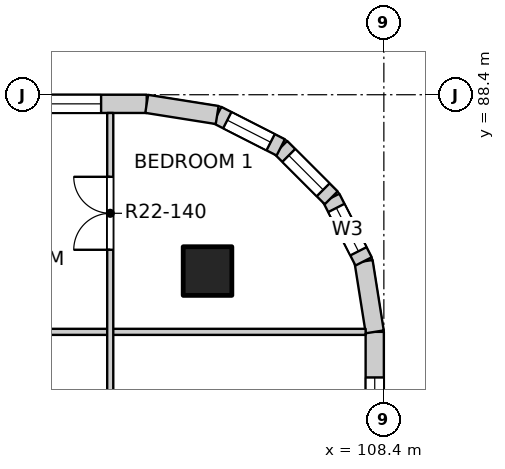
"""IFC4 building model, lengths in metres.
Left out: names, types, materials, properties, quantities, classifications, styles, units other than length and angle.
Written with IfcOpenShell. Run it as: python <this file> out.ifc"""

import sys

from ifc_helpers import new_model, si_unit, direction, frame, frame_2d, origin, origin_2d, place, context, subcontext, project, spatial, rectangle, extrude, element, fill, save


model = new_model("IFC4")
c1 = context("Model", 3, precision=1e-05, world=origin(), true_north=direction((0.0, 1.0)))
c2 = subcontext(c1, "Body", "Model", "MODEL_VIEW")
j1 = project(units=[si_unit("LENGTHUNIT", "METRE"), si_unit("PLANEANGLEUNIT", "RADIAN")], contexts=[c1])
p1 = place(None, origin())
s1 = spatial("IfcSite", under=j1, at=p1, CompositionType="ELEMENT")
p2 = place(p1, origin())
s2 = spatial("IfcBuilding", under=s1, at=p2, CompositionType="ELEMENT")
p3 = place(p2, frame((0.0, 0.0, 224.5)))
s3 = spatial("IfcBuildingStorey", under=s2, at=p3, CompositionType="ELEMENT", Elevation=224.5)
p4 = place(p3, frame((105.5, 85.5, -0.25), z_axis=(0.0, 0.0, 1.0), x_axis=(1.0, 0.0, 0.0)))
e1 = element("IfcColumn", 1, at=p4, inside=s3, PredefinedType="COLUMN", context=c2, shape_type="SweptSolid", body=[
    extrude(rectangle(XDim=0.8, YDim=0.8, at=origin_2d()), origin(), (0.0, 0.0, 1.0), 3.4),
])
p5 = place(p3, frame((108.25, 77.1, 0.0), z_axis=(0.0, 0.0, 1.0), x_axis=(0.0, 1.0, 0.0)))
e2 = element("IfcWall", 2, at=p5, inside=s3, PredefinedType="SOLIDWALL", context=c2, shape_type="SweptSolid", body=[
    extrude(rectangle(XDim=7.4, YDim=0.3, at=frame_2d((3.7, 0.0))), origin(), (0.0, 0.0, 1.0), 2.7),
])
p6 = place(p5, frame((0.35, 0.0, 0.9)))
e3 = element("IfcOpeningElement", 3, at=p6, cuts=e2, PredefinedType="OPENING", context=c2, shape_type="SweptSolid", body=[
    extrude(rectangle(XDim=2.4, YDim=1.8, at=frame_2d((1.2, 0.9))), frame((0.0, 0.16, 0.0), z_axis=(0.0, -1.0, 0.0), x_axis=(1.0, 0.0, 0.0)), (0.0, 0.0, 1.0), 0.32),
])
p7 = place(p5, frame((4.25, 0.0, 0.9)))
e4 = element("IfcOpeningElement", 4, at=p7, cuts=e2, PredefinedType="OPENING", context=c2, shape_type="SweptSolid", body=[
    extrude(rectangle(XDim=2.4, YDim=1.8, at=frame_2d((1.2, 0.9))), frame((0.0, 0.16, 0.0), z_axis=(0.0, -1.0, 0.0), x_axis=(1.0, 0.0, 0.0)), (0.0, 0.0, 1.0), 0.32),
])
p8 = place(p3, frame((97.1, 88.25, 0.0), z_axis=(0.0, 0.0, 1.0), x_axis=(1.0, 0.0, 0.0)))
e5 = element("IfcWall", 5, at=p8, inside=s3, PredefinedType="SOLIDWALL", context=c2, shape_type="SweptSolid", body=[
    extrude(rectangle(XDim=7.4, YDim=0.3, at=frame_2d((3.7, 0.0))), origin(), (0.0, 0.0, 1.0), 2.7),
])
p9 = place(p8, frame((0.35, 0.0, 0.9)))
e6 = element("IfcOpeningElement", 6, at=p9, cuts=e5, PredefinedType="OPENING", context=c2, shape_type="SweptSolid", body=[
    extrude(rectangle(XDim=2.4, YDim=1.8, at=frame_2d((1.2, 0.9))), frame((0.0, 0.16, 0.0), z_axis=(0.0, -1.0, 0.0), x_axis=(1.0, 0.0, 0.0)), (0.0, 0.0, 1.0), 0.32),
])
p10 = place(p8, frame((4.25, 0.0, 0.9)))
e7 = element("IfcOpeningElement", 7, at=p10, cuts=e5, PredefinedType="OPENING", context=c2, shape_type="SweptSolid", body=[
    extrude(rectangle(XDim=2.4, YDim=1.8, at=frame_2d((1.2, 0.9))), frame((0.0, 0.16, 0.0), z_axis=(0.0, -1.0, 0.0), x_axis=(1.0, 0.0, 0.0)), (0.0, 0.0, 1.0), 0.32),
])
p11 = place(p3, frame((108.25, 84.5, 0.0), z_axis=(0.0, 0.0, 1.0), x_axis=(-0.156496880861, 0.987678452879, 0.0)))
e8 = element("IfcWall", 8, at=p11, inside=s3, PredefinedType="SOLIDWALL", context=c2, shape_type="SweptSolid", body=[
    extrude(rectangle(XDim=1.173, YDim=0.3, at=frame_2d((0.586, 0.0))), origin(), (0.0, 0.0, 1.0), 2.7),
])
p12 = place(p3, frame((108.066, 85.659, 0.0), z_axis=(0.0, 0.0, 1.0), x_axis=(-0.454025524128, 0.890988677504, 0.0)))
e9 = element("IfcWall", 9, at=p12, inside=s3, PredefinedType="SOLIDWALL", context=c2, shape_type="SweptSolid", body=[
    extrude(rectangle(XDim=1.173, YDim=0.3, at=frame_2d((0.587, 0.0))), origin(), (0.0, 0.0, 1.0), 2.7),
])
p13 = place(p12, frame((0.187, 0.0, 0.9)))
e10 = element("IfcOpeningElement", 10, at=p13, cuts=e9, PredefinedType="OPENING", context=c2, shape_type="SweptSolid", body=[
    extrude(rectangle(XDim=0.8, YDim=1.2, at=frame_2d((0.4, 0.6))), frame((0.0, 0.16, 0.0), z_axis=(0.0, -1.0, 0.0), x_axis=(1.0, 0.0, 0.0)), (0.0, 0.0, 1.0), 0.32),
])
p14 = place(p3, frame((107.534, 86.704, 0.0), z_axis=(0.0, 0.0, 1.0), x_axis=(-0.707106781187, 0.707106781187, 0.0)))
e11 = element("IfcWall", 11, at=p14, inside=s3, PredefinedType="SOLIDWALL", context=c2, shape_type="SweptSolid", body=[
    extrude(rectangle(XDim=1.173, YDim=0.3, at=frame_2d((0.586, 0.0))), origin(), (0.0, 0.0, 1.0), 2.7),
])
p15 = place(p14, frame((0.187, 0.0, 0.9)))
e12 = element("IfcOpeningElement", 12, at=p15, cuts=e11, PredefinedType="OPENING", context=c2, shape_type="SweptSolid", body=[
    extrude(rectangle(XDim=0.8, YDim=1.2, at=frame_2d((0.4, 0.6))), frame((0.0, 0.16, 0.0), z_axis=(0.0, -1.0, 0.0), x_axis=(1.0, 0.0, 0.0)), (0.0, 0.0, 1.0), 0.32),
])
p16 = place(p3, frame((106.704, 87.534, 0.0), z_axis=(0.0, 0.0, 1.0), x_axis=(-0.890988677504, 0.454025524128, 0.0)))
e13 = element("IfcWall", 13, at=p16, inside=s3, PredefinedType="SOLIDWALL", context=c2, shape_type="SweptSolid", body=[
    extrude(rectangle(XDim=1.173, YDim=0.3, at=frame_2d((0.587, 0.0))), origin(), (0.0, 0.0, 1.0), 2.7),
])
p17 = place(p16, frame((0.187, 0.0, 0.9)))
e14 = element("IfcOpeningElement", 14, at=p17, cuts=e13, PredefinedType="OPENING", context=c2, shape_type="SweptSolid", body=[
    extrude(rectangle(XDim=0.8, YDim=1.2, at=frame_2d((0.4, 0.6))), frame((0.0, 0.16, 0.0), z_axis=(0.0, -1.0, 0.0), x_axis=(1.0, 0.0, 0.0)), (0.0, 0.0, 1.0), 0.32),
])
p18 = place(p3, frame((105.659, 88.066, 0.0), z_axis=(0.0, 0.0, 1.0), x_axis=(-0.987678452879, 0.156496880861, 0.0)))
e15 = element("IfcWall", 15, at=p18, inside=s3, PredefinedType="SOLIDWALL", context=c2, shape_type="SweptSolid", body=[
    extrude(rectangle(XDim=1.173, YDim=0.3, at=frame_2d((0.586, 0.0))), origin(), (0.0, 0.0, 1.0), 2.7),
])
p19 = place(p3, frame((96.6, 84.5, 0.0), z_axis=(0.0, 0.0, 1.0), x_axis=(1.0, 0.0, 0.0)))
e16 = element("IfcWall", 16, at=p19, inside=s3, PredefinedType="PARTITIONING", context=c2, shape_type="SweptSolid", body=[
    extrude(rectangle(XDim=11.5, YDim=0.1, at=frame_2d((5.75, 0.0))), origin(), (0.0, 0.0, 1.0), 3.15),
])
p20 = place(p19, frame((2.635, 0.0, 0.0)))
e17 = element("IfcOpeningElement", 17, at=p20, cuts=e16, PredefinedType="OPENING", context=c2, shape_type="SweptSolid", body=[
    extrude(rectangle(XDim=0.9, YDim=2.1, at=frame_2d((0.45, 1.05))), frame((0.0, 0.06, 0.0), z_axis=(0.0, -1.0, 0.0), x_axis=(1.0, 0.0, 0.0)), (0.0, 0.0, 1.0), 0.12),
])
p21 = place(p3, frame((103.9, 76.8, 0.0), z_axis=(0.0, 0.0, 1.0), x_axis=(0.0, 1.0, 0.0)))
e18 = element("IfcWall", 18, at=p21, inside=s3, PredefinedType="PARTITIONING", context=c2, shape_type="SweptSolid", body=[
    extrude(rectangle(XDim=11.3, YDim=0.1, at=frame_2d((5.65, 0.0))), origin(), (0.0, 0.0, 1.0), 3.15),
])
p22 = place(p21, frame((1.25, 0.0, 0.0)))
e19 = element("IfcOpeningElement", 19, at=p22, cuts=e18, PredefinedType="OPENING", context=c2, shape_type="SweptSolid", body=[
    extrude(rectangle(XDim=1.2, YDim=2.1, at=frame_2d((0.6, 1.05))), frame((0.0, 0.06, 0.0), z_axis=(0.0, -1.0, 0.0), x_axis=(1.0, 0.0, 0.0)), (0.0, 0.0, 1.0), 0.12),
])
p23 = place(p21, frame((5.15, 0.0, 0.0)))
e20 = element("IfcOpeningElement", 20, at=p23, cuts=e18, PredefinedType="OPENING", context=c2, shape_type="SweptSolid", body=[
    extrude(rectangle(XDim=1.2, YDim=2.1, at=frame_2d((0.6, 1.05))), frame((0.0, 0.06, 0.0), z_axis=(0.0, -1.0, 0.0), x_axis=(1.0, 0.0, 0.0)), (0.0, 0.0, 1.0), 0.12),
])
p24 = place(p21, frame((9.05, 0.0, 0.0)))
e21 = element("IfcOpeningElement", 21, at=p24, cuts=e18, PredefinedType="OPENING", context=c2, shape_type="SweptSolid", body=[
    extrude(rectangle(XDim=1.2, YDim=2.1, at=frame_2d((0.6, 1.05))), frame((0.0, 0.06, 0.0), z_axis=(0.0, -1.0, 0.0), x_axis=(1.0, 0.0, 0.0)), (0.0, 0.0, 1.0), 0.12),
])
p25 = place(p7, origin())
e22 = element("IfcWindow", 22, at=p25, inside=s3, PartitioningType="DOUBLE_PANEL_VERTICAL", PredefinedType="WINDOW", context=c2, shape_type="SweptSolid", body=[
    extrude(rectangle(XDim=2.4, YDim=1.8, at=frame_2d((1.2, 0.9))), frame((0.0, 0.03, 0.0), z_axis=(0.0, -1.0, 0.0), x_axis=(1.0, 0.0, 0.0)), (0.0, 0.0, 1.0), 0.06),
])
fill(e4, e22)
p26 = place(p10, origin())
e23 = element("IfcWindow", 23, at=p26, inside=s3, PartitioningType="DOUBLE_PANEL_VERTICAL", PredefinedType="WINDOW", context=c2, shape_type="SweptSolid", body=[
    extrude(rectangle(XDim=2.4, YDim=1.8, at=frame_2d((1.2, 0.9))), frame((0.0, 0.03, 0.0), z_axis=(0.0, -1.0, 0.0), x_axis=(1.0, 0.0, 0.0)), (0.0, 0.0, 1.0), 0.06),
])
fill(e7, e23)
p27 = place(p13, origin())
e24 = element("IfcWindow", 24, at=p27, inside=s3, PartitioningType="SINGLE_PANEL", PredefinedType="WINDOW", context=c2, shape_type="SweptSolid", body=[
    extrude(rectangle(XDim=0.8, YDim=1.2, at=frame_2d((0.4, 0.6))), frame((0.0, 0.03, 0.0), z_axis=(0.0, -1.0, 0.0), x_axis=(1.0, 0.0, 0.0)), (0.0, 0.0, 1.0), 0.06),
])
fill(e10, e24)
p28 = place(p15, origin())
e25 = element("IfcWindow", 25, at=p28, inside=s3, PartitioningType="SINGLE_PANEL", PredefinedType="WINDOW", context=c2, shape_type="SweptSolid", body=[
    extrude(rectangle(XDim=0.8, YDim=1.2, at=frame_2d((0.4, 0.6))), frame((0.0, 0.03, 0.0), z_axis=(0.0, -1.0, 0.0), x_axis=(1.0, 0.0, 0.0)), (0.0, 0.0, 1.0), 0.06),
])
fill(e12, e25)
p29 = place(p17, origin())
e26 = element("IfcWindow", 26, at=p29, inside=s3, PartitioningType="SINGLE_PANEL", PredefinedType="WINDOW", context=c2, shape_type="SweptSolid", body=[
    extrude(rectangle(XDim=0.8, YDim=1.2, at=frame_2d((0.4, 0.6))), frame((0.0, 0.03, 0.0), z_axis=(0.0, -1.0, 0.0), x_axis=(1.0, 0.0, 0.0)), (0.0, 0.0, 1.0), 0.06),
])
fill(e14, e26)
p30 = place(p24, origin())
e27 = element("IfcDoor", 27, at=p30, inside=s3, OperationType="DOUBLE_DOOR_SINGLE_SWING", PredefinedType="DOOR", context=c2, shape_type="SweptSolid", body=[
    extrude(rectangle(XDim=1.2, YDim=2.1, at=frame_2d((0.6, 1.05))), frame((0.0, 0.025, 0.0), z_axis=(0.0, -1.0, 0.0), x_axis=(1.0, 0.0, 0.0)), (0.0, 0.0, 1.0), 0.05),
])
fill(e21, e27)
save(model, sys.argv[1])
